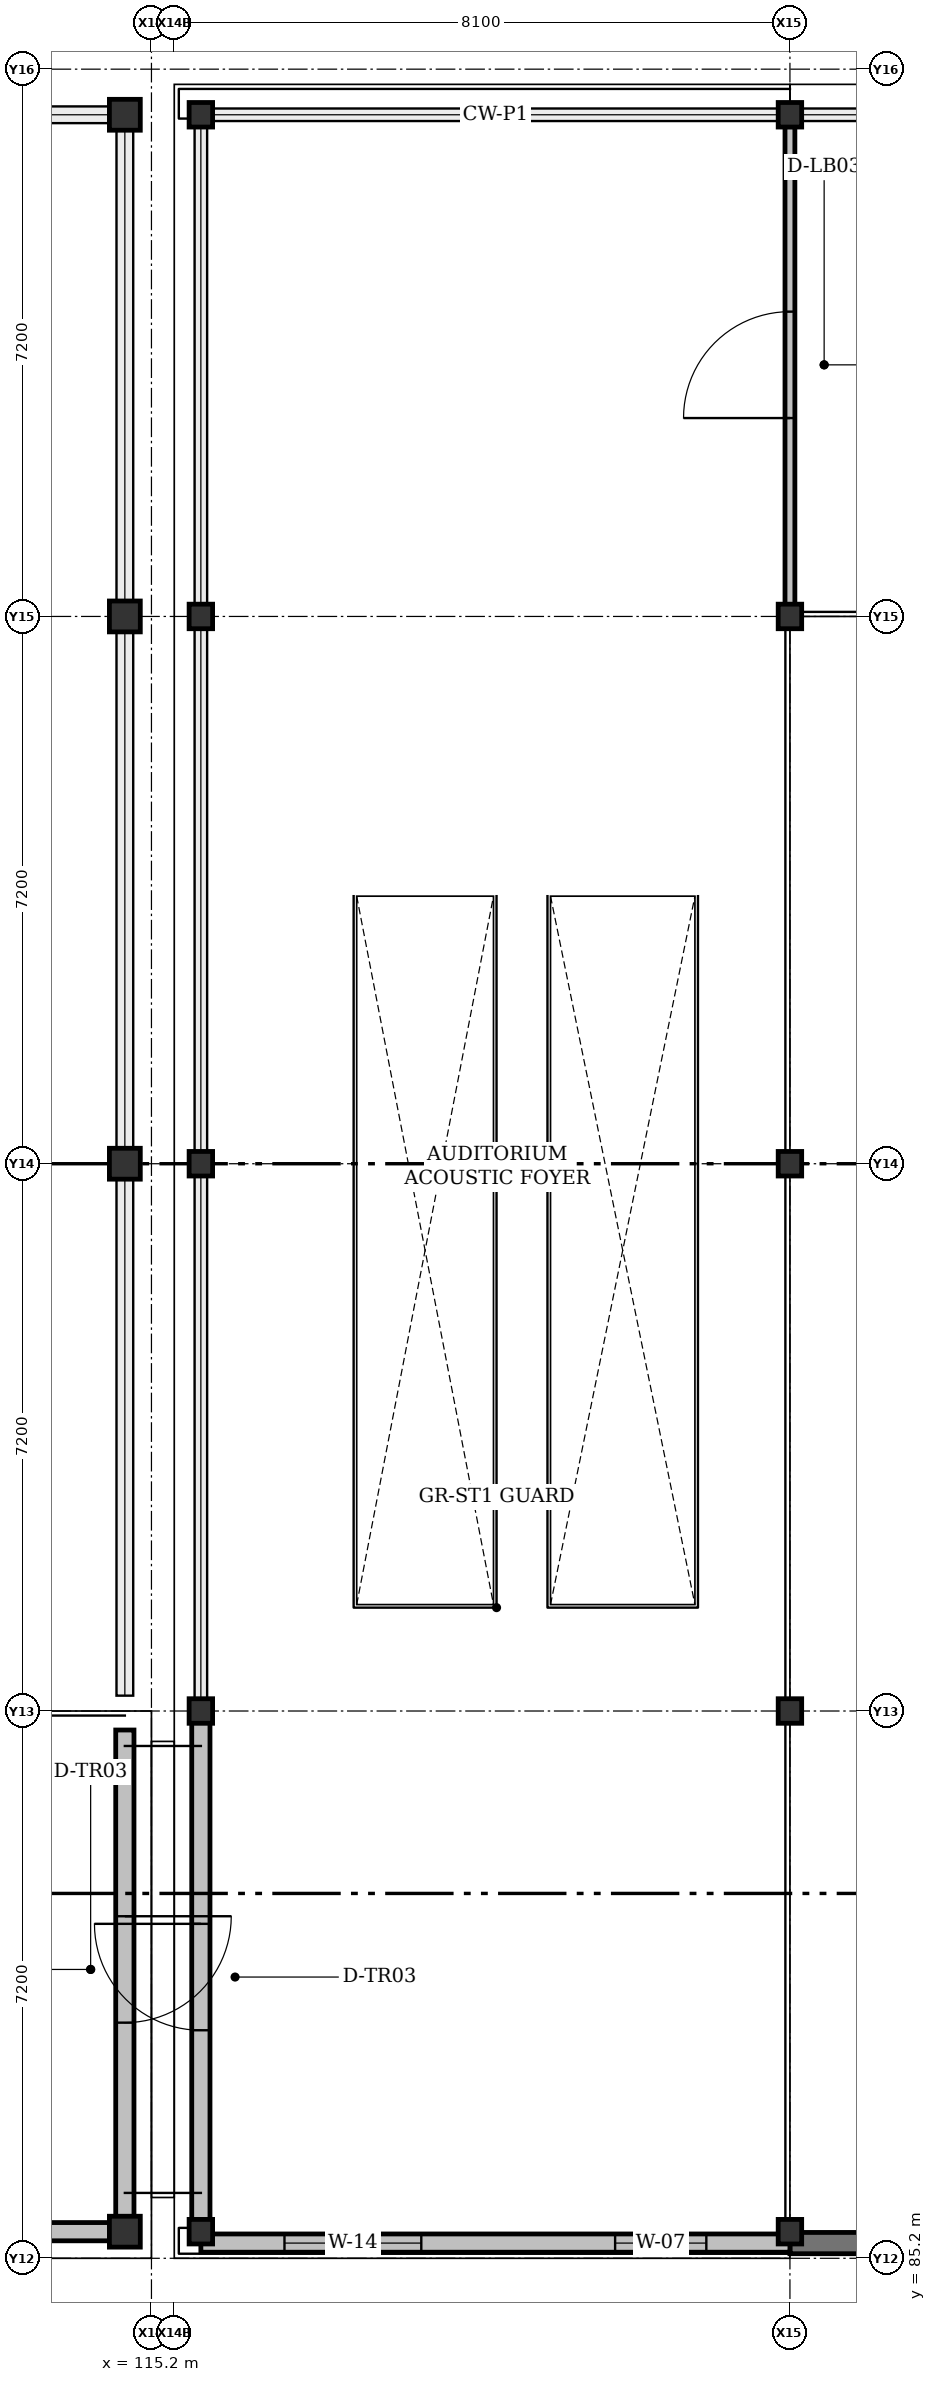
"""IFC4 building model, lengths in metres.
Left out: names, types, materials, properties, quantities, classifications, styles, units other than length and angle.
Written with IfcOpenShell. Run it as: python <this file> out.ifc"""

import sys

from ifc_helpers import new_model, si_unit, direction, frame, frame_2d, origin, origin_2d, place, context, subcontext, project, spatial, rectangle, hollow_circle, i_section, extrude, element, fill, save


model = new_model("IFC4")
c1 = context("Model", 3, precision=1e-05, world=origin(), true_north=direction((0.0, 1.0)))
c2 = subcontext(c1, "Body", "Model", "MODEL_VIEW")
j1 = project(units=[si_unit("LENGTHUNIT", "METRE"), si_unit("PLANEANGLEUNIT", "RADIAN")], contexts=[c1])
p1 = place(None, origin())
s1 = spatial("IfcSite", under=j1, at=p1, CompositionType="ELEMENT")
p2 = place(p1, origin())
s2 = spatial("IfcBuilding", under=s1, at=p2, CompositionType="ELEMENT")
p3 = place(p2, frame((0.0, 0.0, 5.4)))
s3 = spatial("IfcBuildingStorey", under=s2, at=p3, CompositionType="ELEMENT", Elevation=5.4)
p4 = place(p3, frame((114.85, 85.55, 0.0), z_axis=(0.0, 0.0, 1.0), x_axis=(1.0, 0.0, 0.0)))
e1 = element("IfcColumn", 1, at=p4, inside=s3, PredefinedType="COLUMN", context=c2, shape_type="SweptSolid", body=[
    extrude(hollow_circle(Radius=0.203, WallThickness=0.016, at=origin_2d()), origin(), (0.0, 0.0, 1.0), 6.966),
])
p5 = place(p3, frame((114.85, 113.4, 0.0), z_axis=(0.0, 0.0, 1.0), x_axis=(1.0, 0.0, 0.0)))
e2 = element("IfcColumn", 2, at=p5, inside=s3, PredefinedType="COLUMN", context=c2, shape_type="SweptSolid", body=[
    extrude(hollow_circle(Radius=0.203, WallThickness=0.016, at=origin_2d()), origin(), (0.0, 0.0, 1.0), 7.204),
])
p6 = place(p3, frame((114.85, 99.6, 0.0), z_axis=(0.0, 0.0, 1.0), x_axis=(1.0, 0.0, 0.0)))
e3 = element("IfcColumn", 3, at=p6, inside=s3, PredefinedType="COLUMN", context=c2, shape_type="SweptSolid", body=[
    extrude(hollow_circle(Radius=0.203, WallThickness=0.016, at=origin_2d()), origin(), (0.0, 0.0, 1.0), 13.818),
])
p7 = place(p3, frame((114.85, 106.8, 0.0), z_axis=(0.0, 0.0, 1.0), x_axis=(1.0, 0.0, 0.0)))
e4 = element("IfcColumn", 4, at=p7, inside=s3, PredefinedType="COLUMN", context=c2, shape_type="SweptSolid", body=[
    extrude(hollow_circle(Radius=0.203, WallThickness=0.016, at=origin_2d()), origin(), (0.0, 0.0, 1.0), 12.017),
])
for number, where, z_axis, x_axis in (
    (5, (115.85, 85.55, 0.0), (0.0, 0.0, 1.0), (1.0, 0.0, 0.0)),
    (6, (115.85, 92.4, 0.0), (0.0, 0.0, 1.0), (1.0, 0.0, 0.0)),
    (7, (115.85, 99.6, 0.0), (0.0, 0.0, 1.0), (1.0, 0.0, 0.0)),
    (8, (115.85, 106.8, 0.0), (0.0, 0.0, 1.0), (1.0, 0.0, 0.0)),
    (9, (115.85, 113.4, 0.0), (0.0, 0.0, 1.0), (1.0, 0.0, 0.0)),
    (10, (123.6, 85.55, 0.0), (0.0, 0.0, 1.0), (1.0, 0.0, 0.0)),
    (11, (123.6, 92.4, 0.0), (0.0, 0.0, 1.0), (1.0, 0.0, 0.0)),
    (12, (123.6, 99.6, 0.0), (0.0, 0.0, 1.0), (1.0, 0.0, 0.0)),
    (13, (123.6, 106.8, 0.0), (0.0, 0.0, 1.0), (1.0, 0.0, 0.0)),
    (14, (123.6, 113.4, 0.0), (0.0, 0.0, 1.0), (1.0, 0.0, 0.0)),
):
    element("IfcColumn", number, at=place(p3, frame(where, z_axis=z_axis, x_axis=x_axis)), inside=s3, PredefinedType="COLUMN", context=c2, shape_type="SweptSolid", body=[
        extrude(i_section(OverallWidth=0.309, OverallDepth=0.323, WebThickness=0.014, FlangeThickness=0.023, FilletRadius=0.015, at=origin_2d()), origin(), (0.0, 0.0, 1.0), 4.5),
    ])
p8 = place(p3, frame((163.85, 85.4, 0.0), z_axis=(0.0, 0.0, 1.0), x_axis=(-1.0, 0.0, 0.0)))
e15 = element("IfcWall", 15, at=p8, inside=s3, PredefinedType="SOLIDWALL", context=c2, shape_type="SweptSolid", body=[
    extrude(rectangle(XDim=40.25, YDim=0.28, at=frame_2d((20.125, 0.0))), origin(), (0.0, 0.0, 1.0), 4.28),
])
p9 = place(p3, frame((114.649, 85.55, 0.0), z_axis=(0.0, 0.0, 1.0), x_axis=(-1.0, 0.0, 0.0)))
e16 = element("IfcWall", 16, at=p9, inside=s3, PredefinedType="SOLIDWALL", context=c2, shape_type="SweptSolid", body=[
    extrude(rectangle(XDim=8.953, YDim=0.24, at=frame_2d((4.477, 0.0))), origin(), (0.0, 0.0, 1.0), 5.2),
])
p10 = place(p9, frame((0.899, 0.0, 0.92)))
e17 = element("IfcOpeningElement", 17, at=p10, cuts=e16, PredefinedType="OPENING", context=c2, shape_type="SweptSolid", body=[
    extrude(rectangle(XDim=1.6, YDim=1.35, at=frame_2d((0.8, 0.675))), frame((0.0, 0.12, 0.0), z_axis=(0.0, -1.0, 0.0), x_axis=(1.0, 0.0, 0.0)), (0.0, 0.0, 1.0), 0.24),
])
p11 = place(p9, frame((5.954, 0.0, 0.92)))
e18 = element("IfcOpeningElement", 18, at=p11, cuts=e16, PredefinedType="OPENING", context=c2, shape_type="SweptSolid", body=[
    extrude(rectangle(XDim=2.1, YDim=1.4, at=frame_2d((1.05, 0.7))), frame((0.0, 0.12, 0.0), z_axis=(0.0, -1.0, 0.0), x_axis=(1.0, 0.0, 0.0)), (0.0, 0.0, 1.0), 0.24),
])
p12 = place(p3, frame((114.85, 92.15, 0.0), z_axis=(0.0, 0.0, 1.0), x_axis=(0.0, -1.0, 0.0)))
e19 = element("IfcWall", 19, at=p12, inside=s3, PredefinedType="SOLIDWALL", context=c2, shape_type="SweptSolid", body=[
    extrude(rectangle(XDim=6.399, YDim=0.24, at=frame_2d((3.199, 0.0))), origin(), (0.0, 0.0, 1.0), 5.5),
])
p13 = place(p12, frame((2.45, 0.0, 0.0)))
e20 = element("IfcOpeningElement", 20, at=p13, cuts=e19, PredefinedType="OPENING", context=c2, shape_type="SweptSolid", body=[
    extrude(rectangle(XDim=1.4, YDim=2.2, at=frame_2d((0.7, 1.1))), frame((0.0, 0.12, 0.0), z_axis=(0.0, -1.0, 0.0), x_axis=(1.0, 0.0, 0.0)), (0.0, 0.0, 1.0), 0.24),
])
p14 = place(p3, frame((115.85, 85.55, 0.0), z_axis=(0.0, 0.0, 1.0), x_axis=(0.0, 1.0, 0.0)))
e21 = element("IfcWall", 21, at=p14, inside=s3, PredefinedType="SOLIDWALL", context=c2, shape_type="SweptSolid", body=[
    extrude(rectangle(XDim=6.85, YDim=0.24, at=frame_2d((3.425, 0.0))), origin(), (0.0, 0.0, 1.0), 3.731),
])
p15 = place(p14, frame((2.65, 0.0, 0.0)))
e22 = element("IfcOpeningElement", 22, at=p15, cuts=e21, PredefinedType="OPENING", context=c2, shape_type="SweptSolid", body=[
    extrude(rectangle(XDim=1.4, YDim=2.2, at=frame_2d((0.7, 1.1))), frame((0.0, 0.12, 0.0), z_axis=(0.0, -1.0, 0.0), x_axis=(1.0, 0.0, 0.0)), (0.0, 0.0, 1.0), 0.24),
])
p16 = place(p3, frame((123.6, 85.4, 0.0), z_axis=(0.0, 0.0, 1.0), x_axis=(-1.0, 0.0, 0.0)))
e23 = element("IfcWall", 23, at=p16, inside=s3, PredefinedType="SOLIDWALL", context=c2, shape_type="SweptSolid", body=[
    extrude(rectangle(XDim=7.75, YDim=0.24, at=frame_2d((3.875, 0.0))), origin(), (0.0, 0.0, 1.0), 3.8),
])
p17 = place(p16, frame((1.1, 0.0, 0.92)))
e24 = element("IfcOpeningElement", 24, at=p17, cuts=e23, PredefinedType="OPENING", context=c2, shape_type="SweptSolid", body=[
    extrude(rectangle(XDim=1.2, YDim=1.55, at=frame_2d((0.6, 0.775))), frame((0.0, 0.12, 0.0), z_axis=(0.0, -1.0, 0.0), x_axis=(1.0, 0.0, 0.0)), (0.0, 0.0, 1.0), 0.24),
])
p18 = place(p16, frame((4.85, 0.0, 0.92)))
e25 = element("IfcOpeningElement", 25, at=p18, cuts=e23, PredefinedType="OPENING", context=c2, shape_type="SweptSolid", body=[
    extrude(rectangle(XDim=1.8, YDim=1.7, at=frame_2d((0.9, 0.85))), frame((0.0, 0.12, 0.0), z_axis=(0.0, -1.0, 0.0), x_axis=(1.0, 0.0, 0.0)), (0.0, 0.0, 1.0), 0.24),
])
p19 = place(p3, frame((123.6, 106.86, 0.0), z_axis=(0.0, 0.0, 1.0), x_axis=(0.0, 1.0, 0.0)))
e26 = element("IfcWall", 26, at=p19, inside=s3, PredefinedType="PARTITIONING", context=c2, shape_type="SweptSolid", body=[
    extrude(rectangle(XDim=6.383, YDim=0.13, at=frame_2d((3.192, 0.0))), origin(), (0.0, 0.0, 1.0), 3.731),
])
p20 = place(p19, frame((2.55, 0.0, 0.0)))
e27 = element("IfcOpeningElement", 27, at=p20, cuts=e26, PredefinedType="OPENING", context=c2, shape_type="SweptSolid", body=[
    extrude(rectangle(XDim=1.4, YDim=2.25, at=frame_2d((0.7, 1.125))), frame((0.0, 0.065, 0.0), z_axis=(0.0, -1.0, 0.0), x_axis=(1.0, 0.0, 0.0)), (0.0, 0.0, 1.0), 0.13),
])
p21 = place(p13, origin())
e28 = element("IfcDoor", 28, at=p21, inside=s3, OperationType="SINGLE_SWING_LEFT", PredefinedType="DOOR", context=c2, shape_type="SweptSolid", body=[
    extrude(rectangle(XDim=1.4, YDim=2.2, at=frame_2d((0.7, 1.1))), frame((0.0, 0.025, 0.0), z_axis=(0.0, -1.0, 0.0), x_axis=(1.0, 0.0, 0.0)), (0.0, 0.0, 1.0), 0.05),
])
fill(e20, e28)
p22 = place(p15, origin())
e29 = element("IfcDoor", 29, at=p22, inside=s3, OperationType="SINGLE_SWING_RIGHT", PredefinedType="DOOR", context=c2, shape_type="SweptSolid", body=[
    extrude(rectangle(XDim=1.4, YDim=2.2, at=frame_2d((0.7, 1.1))), frame((0.0, 0.025, 0.0), z_axis=(0.0, -1.0, 0.0), x_axis=(1.0, 0.0, 0.0)), (0.0, 0.0, 1.0), 0.05),
])
fill(e22, e29)
p23 = place(p17, origin())
e30 = element("IfcWindow", 30, at=p23, inside=s3, PartitioningType="SINGLE_PANEL", PredefinedType="WINDOW", context=c2, shape_type="SweptSolid", body=[
    extrude(rectangle(XDim=1.2, YDim=1.55, at=frame_2d((0.6, 0.775))), frame((0.0, 0.03, 0.0), z_axis=(0.0, -1.0, 0.0), x_axis=(1.0, 0.0, 0.0)), (0.0, 0.0, 1.0), 0.06),
])
fill(e24, e30)
p24 = place(p18, origin())
e31 = element("IfcWindow", 31, at=p24, inside=s3, PartitioningType="DOUBLE_PANEL_VERTICAL", PredefinedType="WINDOW", context=c2, shape_type="SweptSolid", body=[
    extrude(rectangle(XDim=1.8, YDim=1.7, at=frame_2d((0.9, 0.85))), frame((0.0, 0.03, 0.0), z_axis=(0.0, -1.0, 0.0), x_axis=(1.0, 0.0, 0.0)), (0.0, 0.0, 1.0), 0.06),
])
fill(e25, e31)
p25 = place(p20, origin())
e32 = element("IfcDoor", 32, at=p25, inside=s3, OperationType="SINGLE_SWING_LEFT", PredefinedType="DOOR", context=c2, shape_type="SweptSolid", body=[
    extrude(rectangle(XDim=1.4, YDim=2.25, at=frame_2d((0.7, 1.125))), frame((0.0, 0.025, 0.0), z_axis=(0.0, -1.0, 0.0), x_axis=(1.0, 0.0, 0.0)), (0.0, 0.0, 1.0), 0.05),
])
fill(e27, e32)
save(model, sys.argv[1])
